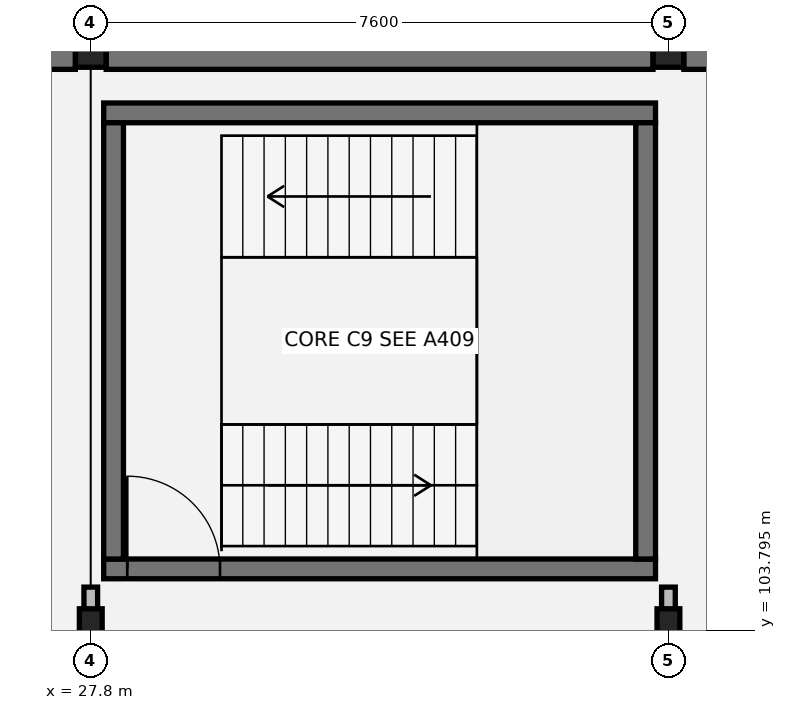
"""IFC4 building model, lengths in metres.
Left out: names, types, materials, properties, quantities, classifications, styles, units other than length and angle.
Written with IfcOpenShell. Run it as: python <this file> out.ifc"""

import sys

from ifc_helpers import new_model, si_unit, direction, frame, frame_2d, origin, origin_2d, place, context, subcontext, project, spatial, rectangle, hollow_rectangle, i_section, extrude, element, fill, save


model = new_model("IFC4")
c1 = context("Model", 3, precision=1e-05, world=origin(), true_north=direction((0.0, 1.0)))
c2 = subcontext(c1, "Body", "Model", "MODEL_VIEW")
j1 = project(units=[si_unit("LENGTHUNIT", "METRE"), si_unit("PLANEANGLEUNIT", "RADIAN")], contexts=[c1])
p1 = place(None, origin())
s1 = spatial("IfcSite", under=j1, at=p1, CompositionType="ELEMENT")
p2 = place(p1, origin())
s2 = spatial("IfcBuilding", under=s1, at=p2, CompositionType="ELEMENT")
p3 = place(p2, frame((0.0, 0.0, -4.42)))
s3 = spatial("IfcBuildingStorey", under=s2, at=p3, CompositionType="ELEMENT", Elevation=-4.42)
p4 = place(p3, frame((27.8, 103.8, 0.0), z_axis=(0.0, 0.0, 1.0), x_axis=(1.0, 0.0, 0.0)))
e1 = element("IfcColumn", 1, at=p4, inside=s3, PredefinedType="COLUMN", context=c2, shape_type="SweptSolid", body=[
    extrude(i_section(OverallWidth=0.3, OverallDepth=0.55, WebThickness=0.015, FlangeThickness=0.029, at=origin_2d()), origin(), (0.0, 0.0, 1.0), 4.395),
])
p5 = place(p3, frame((27.8, 111.4, 0.0), z_axis=(0.0, 0.0, 1.0), x_axis=(1.0, 0.0, 0.0)))
e2 = element("IfcColumn", 2, at=p5, inside=s3, PredefinedType="COLUMN", context=c2, shape_type="SweptSolid", body=[
    extrude(hollow_rectangle(XDim=0.4, YDim=0.4, WallThickness=0.016, at=origin_2d()), origin(), (0.0, 0.0, 1.0), 4.395),
])
p6 = place(p3, frame((35.4, 103.8, 0.0), z_axis=(0.0, 0.0, 1.0), x_axis=(1.0, 0.0, 0.0)))
e3 = element("IfcColumn", 3, at=p6, inside=s3, PredefinedType="COLUMN", context=c2, shape_type="SweptSolid", body=[
    extrude(i_section(OverallWidth=0.3, OverallDepth=0.55, WebThickness=0.015, FlangeThickness=0.029, at=origin_2d()), origin(), (0.0, 0.0, 1.0), 4.395),
])
p7 = place(p3, frame((35.4, 111.4, 0.0), z_axis=(0.0, 0.0, 1.0), x_axis=(1.0, 0.0, 0.0)))
e4 = element("IfcColumn", 4, at=p7, inside=s3, PredefinedType="COLUMN", context=c2, shape_type="SweptSolid", body=[
    extrude(hollow_rectangle(XDim=0.4, YDim=0.4, WallThickness=0.016, at=origin_2d()), origin(), (0.0, 0.0, 1.0), 4.395),
])
p8 = place(p3, frame((20.403, 111.4, 0.0), z_axis=(0.0, 0.0, 1.0), x_axis=(1.0, 0.0, 0.0)))
e5 = element("IfcWall", 5, at=p8, inside=s3, PredefinedType="USERDEFINED", context=c2, shape_type="SweptSolid", body=[
    extrude(rectangle(XDim=7.194, YDim=0.455, at=frame_2d((3.597, 0.0))), origin(), (0.0, 0.0, 1.0), 3.82),
])
for number, where, z_axis, x_axis in (
    (6, (28.003, 111.4, 0.0), (0.0, 0.0, 1.0), (1.0, 0.0, 0.0)),
    (7, (35.603, 111.4, 0.0), (0.0, 0.0, 1.0), (1.0, 0.0, 0.0)),
):
    element("IfcWall", number, at=place(p3, frame(where, z_axis=z_axis, x_axis=x_axis)), inside=s3, PredefinedType="USERDEFINED", context=c2, shape_type="SweptSolid", body=[
        extrude(rectangle(XDim=7.194, YDim=0.455, at=frame_2d((3.597, 0.0))), origin(), (0.0, 0.0, 1.0), 3.82),
    ])
p9 = place(p3, frame((27.97, 104.6, 0.0), z_axis=(0.0, 0.0, 1.0), x_axis=(1.0, 0.0, 0.0)))
e8 = element("IfcWall", 8, at=p9, inside=s3, PredefinedType="SHEAR", context=c2, shape_type="SweptSolid", body=[
    extrude(rectangle(XDim=7.26, YDim=0.26, at=frame_2d((3.63, 0.0))), origin(), (0.0, 0.0, 1.0), 4.185),
])
p10 = place(p9, frame((0.31, 0.0, 0.0)))
e9 = element("IfcOpeningElement", 9, at=p10, cuts=e8, PredefinedType="OPENING", context=c2, shape_type="SweptSolid", body=[
    extrude(rectangle(XDim=1.22, YDim=2.18, at=frame_2d((0.61, 1.09))), frame((0.0, 0.14, 0.0), z_axis=(0.0, -1.0, 0.0), x_axis=(1.0, 0.0, 0.0)), (0.0, 0.0, 1.0), 0.28),
])
p11 = place(p3, frame((27.97, 110.6, 0.0), z_axis=(0.0, 0.0, 1.0), x_axis=(1.0, 0.0, 0.0)))
e10 = element("IfcWall", 10, at=p11, inside=s3, PredefinedType="SHEAR", context=c2, shape_type="SweptSolid", body=[
    extrude(rectangle(XDim=7.26, YDim=0.26, at=frame_2d((3.63, 0.0))), origin(), (0.0, 0.0, 1.0), 4.185),
])
for number, where, z_axis, x_axis in (
    (11, (28.1, 104.73, 0.0), (0.0, 0.0, 1.0), (0.0, 1.0, 0.0)),
    (12, (35.1, 104.73, 0.0), (0.0, 0.0, 1.0), (0.0, 1.0, 0.0)),
):
    element("IfcWall", number, at=place(p3, frame(where, z_axis=z_axis, x_axis=x_axis)), inside=s3, PredefinedType="SHEAR", context=c2, shape_type="SweptSolid", body=[
        extrude(rectangle(XDim=5.74, YDim=0.26, at=frame_2d((2.87, 0.0))), origin(), (0.0, 0.0, 1.0), 4.185),
    ])
for number, where, z_axis, x_axis in (
    (13, (27.8, 104.04, 0.0), (0.0, 0.0, 1.0), (0.0, 1.0, 0.0)),
    (14, (35.4, 104.04, 0.0), (0.0, 0.0, 1.0), (0.0, 1.0, 0.0)),
):
    element("IfcWall", number, at=place(p3, frame(where, z_axis=z_axis, x_axis=x_axis)), inside=s3, PredefinedType="PARTITIONING", context=c2, shape_type="SweptSolid", body=[
        extrude(rectangle(XDim=0.32, YDim=0.18, at=frame_2d((0.16, 0.0))), origin(), (0.0, 0.0, 1.0), 3.52),
    ])
p12 = place(p10, origin())
e15 = element("IfcDoor", 15, at=p12, inside=s3, OperationType="SINGLE_SWING_LEFT", PredefinedType="DOOR", context=c2, shape_type="SweptSolid", body=[
    extrude(rectangle(XDim=1.22, YDim=2.18, at=frame_2d((0.61, 1.09))), frame((0.0, 0.025, 0.0), z_axis=(0.0, -1.0, 0.0), x_axis=(1.0, 0.0, 0.0)), (0.0, 0.0, 1.0), 0.05),
])
fill(e9, e15)
save(model, sys.argv[1])
